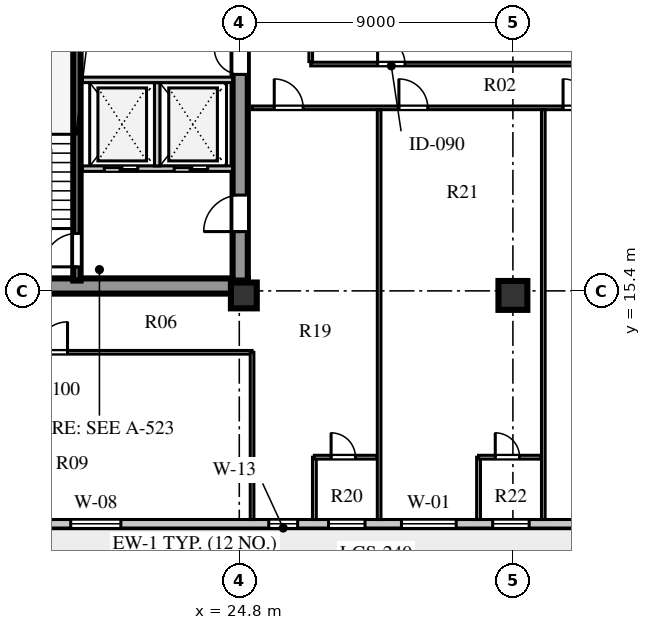
"""IFC4 building model, lengths in metres.
Left out: names, types, materials, properties, quantities, classifications, styles, units other than length and angle.
Written with IfcOpenShell. Run it as: python <this file> out.ifc"""

import sys

from ifc_helpers import new_model, si_unit, direction, frame, frame_2d, origin, origin_2d, place, context, subcontext, project, spatial, rectangle, extrude, element, fill, save


model = new_model("IFC4")
c1 = context("Model", 3, precision=1e-05, world=origin(), true_north=direction((0.0, 1.0)))
c2 = subcontext(c1, "Body", "Model", "MODEL_VIEW")
j1 = project(units=[si_unit("LENGTHUNIT", "METRE"), si_unit("PLANEANGLEUNIT", "RADIAN")], contexts=[c1])
p1 = place(None, origin())
s1 = spatial("IfcSite", under=j1, at=p1, CompositionType="ELEMENT")
p2 = place(p1, origin())
s2 = spatial("IfcBuilding", under=s1, at=p2, CompositionType="ELEMENT")
p3 = place(p2, frame((0.0, 0.0, 173.3)))
s3 = spatial("IfcBuildingStorey", under=s2, at=p3, CompositionType="ELEMENT", Elevation=173.3)
p4 = place(p3, frame((15.4, 15.56, 0.0), z_axis=(0.0, 0.0, 1.0), x_axis=(1.0, 0.0, 0.0)))
e1 = element("IfcWall", 1, at=p4, inside=s3, PredefinedType="SHEAR", context=c2, shape_type="SweptSolid", body=[
    extrude(rectangle(XDim=9.68, YDim=0.5, at=frame_2d((4.84, 0.0))), origin(), (0.0, 0.0, 1.0), 3.6),
])
p5 = place(p3, frame((24.83, 15.74, 0.0), z_axis=(0.0, 0.0, 1.0), x_axis=(0.0, 1.0, 0.0)))
e2 = element("IfcWall", 2, at=p5, inside=s3, PredefinedType="SHEAR", context=c2, shape_type="SweptSolid", body=[
    extrude(rectangle(XDim=25.76, YDim=0.5, at=frame_2d((12.88, 0.0))), origin(), (0.0, 0.0, 1.0), 3.6),
])
p6 = place(p5, frame((1.61, 0.0, 0.0)))
e3 = element("IfcOpeningElement", 3, at=p6, cuts=e2, PredefinedType="OPENING", context=c2, shape_type="SweptSolid", body=[
    extrude(rectangle(XDim=1.2, YDim=2.1, at=frame_2d((0.6, 1.05))), frame((0.0, 0.26, 0.0), z_axis=(0.0, -1.0, 0.0), x_axis=(1.0, 0.0, 0.0)), (0.0, 0.0, 1.0), 0.52),
])
p7 = place(p5, frame((6.78, 0.0, 0.0)))
e4 = element("IfcOpeningElement", 4, at=p7, cuts=e2, PredefinedType="OPENING", context=c2, shape_type="SweptSolid", body=[
    extrude(rectangle(XDim=0.85, YDim=2.06, at=frame_2d((0.425, 1.03))), frame((0.0, 0.26, 0.0), z_axis=(0.0, -1.0, 0.0), x_axis=(1.0, 0.0, 0.0)), (0.0, 0.0, 1.0), 0.52),
])
p8 = place(p5, frame((12.11, 0.0, 0.0)))
e5 = element("IfcOpeningElement", 5, at=p8, cuts=e2, PredefinedType="OPENING", context=c2, shape_type="SweptSolid", body=[
    extrude(rectangle(XDim=1.5, YDim=2.12, at=frame_2d((0.75, 1.06))), frame((0.0, 0.26, 0.0), z_axis=(0.0, -1.0, 0.0), x_axis=(1.0, 0.0, 0.0)), (0.0, 0.0, 1.0), 0.52),
])
p9 = place(p5, frame((20.11, 0.0, 0.0)))
e6 = element("IfcOpeningElement", 6, at=p9, cuts=e2, PredefinedType="OPENING", context=c2, shape_type="SweptSolid", body=[
    extrude(rectangle(XDim=1.2, YDim=2.12, at=frame_2d((0.6, 1.06))), frame((0.0, 0.26, 0.0), z_axis=(0.0, -1.0, 0.0), x_axis=(1.0, 0.0, 0.0)), (0.0, 0.0, 1.0), 0.52),
])
p10 = place(p5, frame((24.01, 0.0, 0.0)))
e7 = element("IfcOpeningElement", 7, at=p10, cuts=e2, PredefinedType="OPENING", context=c2, shape_type="SweptSolid", body=[
    extrude(rectangle(XDim=0.95, YDim=2.1, at=frame_2d((0.475, 1.05))), frame((0.0, 0.26, 0.0), z_axis=(0.0, -1.0, 0.0), x_axis=(1.0, 0.0, 0.0)), (0.0, 0.0, 1.0), 0.52),
])
p11 = place(p3, frame((24.95, 15.25, 0.0), z_axis=(0.0, 0.0, 1.0), x_axis=(1.0, 0.0, 0.0)))
e8 = element("IfcColumn", 8, at=p11, inside=s3, PredefinedType="COLUMN", context=c2, shape_type="SweptSolid", body=[
    extrude(rectangle(XDim=0.85, YDim=0.85, at=origin_2d()), origin(), (0.0, 0.0, 1.0), 3.6),
])
p12 = place(p3, frame((33.8, 15.25, 0.0), z_axis=(0.0, 0.0, 1.0), x_axis=(1.0, 0.0, 0.0)))
e9 = element("IfcColumn", 9, at=p12, inside=s3, PredefinedType="COLUMN", context=c2, shape_type="SweptSolid", body=[
    extrude(rectangle(XDim=0.95, YDim=0.95, at=origin_2d()), origin(), (0.0, 0.0, 1.0), 3.6),
])
p13 = place(p3, frame((13.05, 7.74, 0.0), z_axis=(0.0, 0.0, 1.0), x_axis=(1.0, 0.0, 0.0)))
e10 = element("IfcWall", 10, at=p13, inside=s3, PredefinedType="STANDARD", context=c2, shape_type="SweptSolid", body=[
    extrude(rectangle(XDim=32.5, YDim=0.28, at=frame_2d((16.25, 0.0))), origin(), (0.0, 0.0, 1.0), 3.6),
])
p14 = place(p13, frame((0.95, 0.0, 0.0)))
e11 = element("IfcOpeningElement", 11, at=p14, cuts=e10, PredefinedType="OPENING", context=c2, shape_type="SweptSolid", body=[
    extrude(rectangle(XDim=1.0, YDim=2.05, at=frame_2d((0.5, 1.025))), frame((0.0, 0.15, 0.0), z_axis=(0.0, -1.0, 0.0), x_axis=(1.0, 0.0, 0.0)), (0.0, 0.0, 1.0), 0.3),
])
p15 = place(p13, frame((6.205, 0.0, 0.8)))
e12 = element("IfcOpeningElement", 12, at=p15, cuts=e10, PredefinedType="OPENING", context=c2, shape_type="SweptSolid", body=[
    extrude(rectangle(XDim=1.65, YDim=1.95, at=frame_2d((0.825, 0.975))), frame((0.0, 0.15, 0.0), z_axis=(0.0, -1.0, 0.0), x_axis=(1.0, 0.0, 0.0)), (0.0, 0.0, 1.0), 0.3),
])
p16 = place(p13, frame((12.72, 0.0, 0.8)))
e13 = element("IfcOpeningElement", 13, at=p16, cuts=e10, PredefinedType="OPENING", context=c2, shape_type="SweptSolid", body=[
    extrude(rectangle(XDim=0.95, YDim=1.65, at=frame_2d((0.475, 0.825))), frame((0.0, 0.15, 0.0), z_axis=(0.0, -1.0, 0.0), x_axis=(1.0, 0.0, 0.0)), (0.0, 0.0, 1.0), 0.3),
])
p17 = place(p13, frame((14.685, 0.0, 0.8)))
e14 = element("IfcOpeningElement", 14, at=p17, cuts=e10, PredefinedType="OPENING", context=c2, shape_type="SweptSolid", body=[
    extrude(rectangle(XDim=1.2, YDim=1.75, at=frame_2d((0.6, 0.875))), frame((0.0, 0.15, 0.0), z_axis=(0.0, -1.0, 0.0), x_axis=(1.0, 0.0, 0.0)), (0.0, 0.0, 1.0), 0.3),
])
p18 = place(p13, frame((17.085, 0.0, 0.8)))
e15 = element("IfcOpeningElement", 15, at=p18, cuts=e10, PredefinedType="OPENING", context=c2, shape_type="SweptSolid", body=[
    extrude(rectangle(XDim=1.8, YDim=2.0, at=frame_2d((0.9, 1.0))), frame((0.0, 0.15, 0.0), z_axis=(0.0, -1.0, 0.0), x_axis=(1.0, 0.0, 0.0)), (0.0, 0.0, 1.0), 0.3),
])
p19 = place(p13, frame((20.085, 0.0, 0.8)))
e16 = element("IfcOpeningElement", 16, at=p19, cuts=e10, PredefinedType="OPENING", context=c2, shape_type="SweptSolid", body=[
    extrude(rectangle(XDim=1.2, YDim=1.75, at=frame_2d((0.6, 0.875))), frame((0.0, 0.15, 0.0), z_axis=(0.0, -1.0, 0.0), x_axis=(1.0, 0.0, 0.0)), (0.0, 0.0, 1.0), 0.3),
])
p20 = place(p13, frame((23.055, 0.0, 0.8)))
e17 = element("IfcOpeningElement", 17, at=p20, cuts=e10, PredefinedType="OPENING", context=c2, shape_type="SweptSolid", body=[
    extrude(rectangle(XDim=1.2, YDim=1.75, at=frame_2d((0.6, 0.875))), frame((0.0, 0.15, 0.0), z_axis=(0.0, -1.0, 0.0), x_axis=(1.0, 0.0, 0.0)), (0.0, 0.0, 1.0), 0.3),
])
p21 = place(p13, frame((26.065, 0.0, 0.8)))
e18 = element("IfcOpeningElement", 18, at=p21, cuts=e10, PredefinedType="OPENING", context=c2, shape_type="SweptSolid", body=[
    extrude(rectangle(XDim=1.2, YDim=1.75, at=frame_2d((0.6, 0.875))), frame((0.0, 0.15, 0.0), z_axis=(0.0, -1.0, 0.0), x_axis=(1.0, 0.0, 0.0)), (0.0, 0.0, 1.0), 0.3),
])
p22 = place(p13, frame((29.03, 0.0, 0.8)))
e19 = element("IfcOpeningElement", 19, at=p22, cuts=e10, PredefinedType="OPENING", context=c2, shape_type="SweptSolid", body=[
    extrude(rectangle(XDim=2.1, YDim=1.95, at=frame_2d((1.05, 0.975))), frame((0.0, 0.15, 0.0), z_axis=(0.0, -1.0, 0.0), x_axis=(1.0, 0.0, 0.0)), (0.0, 0.0, 1.0), 0.3),
])
p23 = place(p3, frame((19.46, 15.74, 0.0), z_axis=(0.0, 0.0, 1.0), x_axis=(0.0, 1.0, 0.0)))
e20 = element("IfcWall", 20, at=p23, inside=s3, PredefinedType="SHEAR", context=c2, shape_type="SweptSolid", body=[
    extrude(rectangle(XDim=8.2, YDim=0.24, at=frame_2d((4.1, 0.0))), origin(), (0.0, 0.0, 1.0), 3.85),
])
p24 = place(p23, frame((0.45, 0.0, 0.0)))
e21 = element("IfcOpeningElement", 21, at=p24, cuts=e20, PredefinedType="OPENING", context=c2, shape_type="SweptSolid", body=[
    extrude(rectangle(XDim=1.1, YDim=2.1, at=frame_2d((0.55, 1.05))), frame((0.0, 0.13, 0.0), z_axis=(0.0, -1.0, 0.0), x_axis=(1.0, 0.0, 0.0)), (0.0, 0.0, 1.0), 0.26),
])
p25 = place(p3, frame((19.64, 19.42, 0.0), z_axis=(0.0, 0.0, 1.0), x_axis=(1.0, 0.0, 0.0)))
e22 = element("IfcWall", 22, at=p25, inside=s3, PredefinedType="SOLIDWALL", context=c2, shape_type="SweptSolid", body=[
    extrude(rectangle(XDim=4.94, YDim=0.18, at=frame_2d((2.47, 0.0))), origin(), (0.0, 0.0, 1.0), 3.6),
])
p26 = place(p25, frame((0.72, 0.0, 0.0)))
e23 = element("IfcOpeningElement", 23, at=p26, cuts=e22, PredefinedType="OPENING", context=c2, shape_type="SweptSolid", body=[
    extrude(rectangle(XDim=1.1, YDim=2.1, at=frame_2d((0.55, 1.05))), frame((0.0, 0.1, 0.0), z_axis=(0.0, -1.0, 0.0), x_axis=(1.0, 0.0, 0.0)), (0.0, 0.0, 1.0), 0.2),
])
p27 = place(p25, frame((3.02, 0.0, 0.0)))
e24 = element("IfcOpeningElement", 24, at=p27, cuts=e22, PredefinedType="OPENING", context=c2, shape_type="SweptSolid", body=[
    extrude(rectangle(XDim=1.1, YDim=2.1, at=frame_2d((0.55, 1.05))), frame((0.0, 0.1, 0.0), z_axis=(0.0, -1.0, 0.0), x_axis=(1.0, 0.0, 0.0)), (0.0, 0.0, 1.0), 0.2),
])
p28 = place(p3, frame((22.1, 19.51, 0.0), z_axis=(0.0, 0.0, 1.0), x_axis=(0.0, 1.0, 0.0)))
e25 = element("IfcWall", 25, at=p28, inside=s3, PredefinedType="SOLIDWALL", context=c2, shape_type="SweptSolid", body=[
    extrude(rectangle(XDim=2.74, YDim=0.18, at=frame_2d((1.37, 0.0))), origin(), (0.0, 0.0, 1.0), 3.6),
])
p29 = place(p3, frame((19.64, 22.34, 0.0), z_axis=(0.0, 0.0, 1.0), x_axis=(1.0, 0.0, 0.0)))
e26 = element("IfcWall", 26, at=p29, inside=s3, PredefinedType="SOLIDWALL", context=c2, shape_type="SweptSolid", body=[
    extrude(rectangle(XDim=4.94, YDim=0.18, at=frame_2d((2.47, 0.0))), origin(), (0.0, 0.0, 1.0), 3.6),
])
p30 = place(p3, frame((25.22, 21.42, 0.0), z_axis=(0.0, 0.0, 1.0), x_axis=(1.0, 0.0, 0.0)))
e27 = element("IfcWall", 27, at=p30, inside=s3, PredefinedType="PARTITIONING", context=c2, shape_type="SweptSolid", body=[
    extrude(rectangle(XDim=15.6, YDim=0.12, at=frame_2d((7.8, 0.0))), origin(), (0.0, 0.0, 1.0), 3.25),
])
p31 = place(p30, frame((0.73, 0.0, 0.0)))
e28 = element("IfcOpeningElement", 28, at=p31, cuts=e27, PredefinedType="OPENING", context=c2, shape_type="SweptSolid", body=[
    extrude(rectangle(XDim=0.95, YDim=2.1, at=frame_2d((0.475, 1.05))), frame((0.0, 0.07, 0.0), z_axis=(0.0, -1.0, 0.0), x_axis=(1.0, 0.0, 0.0)), (0.0, 0.0, 1.0), 0.14),
])
p32 = place(p30, frame((4.83, 0.0, 0.0)))
e29 = element("IfcOpeningElement", 29, at=p32, cuts=e27, PredefinedType="OPENING", context=c2, shape_type="SweptSolid", body=[
    extrude(rectangle(XDim=0.95, YDim=2.1, at=frame_2d((0.475, 1.05))), frame((0.0, 0.07, 0.0), z_axis=(0.0, -1.0, 0.0), x_axis=(1.0, 0.0, 0.0)), (0.0, 0.0, 1.0), 0.14),
])
p33 = place(p30, frame((10.23, 0.0, 0.0)))
e30 = element("IfcOpeningElement", 30, at=p33, cuts=e27, PredefinedType="OPENING", context=c2, shape_type="SweptSolid", body=[
    extrude(rectangle(XDim=0.95, YDim=2.1, at=frame_2d((0.475, 1.05))), frame((0.0, 0.07, 0.0), z_axis=(0.0, -1.0, 0.0), x_axis=(1.0, 0.0, 0.0)), (0.0, 0.0, 1.0), 0.14),
])
p34 = place(p3, frame((27.15, 22.86, 0.0), z_axis=(0.0, 0.0, 1.0), x_axis=(1.0, 0.0, 0.0)))
e31 = element("IfcWall", 31, at=p34, inside=s3, PredefinedType="PARTITIONING", context=c2, shape_type="SweptSolid", body=[
    extrude(rectangle(XDim=13.67, YDim=0.12, at=frame_2d((6.835, 0.0))), origin(), (0.0, 0.0, 1.0), 3.6),
])
p35 = place(p34, frame((2.2, 0.0, 0.0)))
e32 = element("IfcOpeningElement", 32, at=p35, cuts=e31, PredefinedType="OPENING", context=c2, shape_type="SweptSolid", body=[
    extrude(rectangle(XDim=0.9, YDim=2.08, at=frame_2d((0.45, 1.04))), frame((0.0, 0.07, 0.0), z_axis=(0.0, -1.0, 0.0), x_axis=(1.0, 0.0, 0.0)), (0.0, 0.0, 1.0), 0.14),
])
p36 = place(p3, frame((13.39, 13.38, 0.0), z_axis=(0.0, 0.0, 1.0), x_axis=(1.0, 0.0, 0.0)))
e33 = element("IfcWall", 33, at=p36, inside=s3, PredefinedType="PARTITIONING", context=c2, shape_type="SweptSolid", body=[
    extrude(rectangle(XDim=11.83, YDim=0.12, at=frame_2d((5.915, 0.0))), origin(), (0.0, 0.0, 1.0), 3.6),
])
p37 = place(p36, frame((4.76, 0.0, 0.0)))
e34 = element("IfcOpeningElement", 34, at=p37, cuts=e33, PredefinedType="OPENING", context=c2, shape_type="SweptSolid", body=[
    extrude(rectangle(XDim=1.0, YDim=2.08, at=frame_2d((0.5, 1.04))), frame((0.0, 0.07, 0.0), z_axis=(0.0, -1.0, 0.0), x_axis=(1.0, 0.0, 0.0)), (0.0, 0.0, 1.0), 0.14),
])
p38 = place(p3, frame((25.22, 7.88, 0.0), z_axis=(0.0, 0.0, 1.0), x_axis=(0.0, 1.0, 0.0)))
e35 = element("IfcWall", 35, at=p38, inside=s3, PredefinedType="PARTITIONING", context=c2, shape_type="SweptSolid", body=[
    extrude(rectangle(XDim=5.5, YDim=0.12, at=frame_2d((2.75, 0.0))), origin(), (0.0, 0.0, 1.0), 3.15),
])
p39 = place(p3, frame((27.15, 22.94, 0.0), z_axis=(0.0, 0.0, 1.0), x_axis=(0.0, 1.0, 0.0)))
e36 = element("IfcWall", 36, at=p39, inside=s3, PredefinedType="PARTITIONING", context=c2, shape_type="SweptSolid", body=[
    extrude(rectangle(XDim=1.94, YDim=0.12, at=frame_2d((0.97, 0.0))), origin(), (0.0, 0.0, 1.0), 3.6),
])
p40 = place(p3, frame((27.27, 7.88, 0.0), z_axis=(0.0, 0.0, 1.0), x_axis=(0.0, 1.0, 0.0)))
e37 = element("IfcWall", 37, at=p40, inside=s3, PredefinedType="PLUMBINGWALL", context=c2, shape_type="SweptSolid", body=[
    extrude(rectangle(XDim=2.05, YDim=0.125, at=frame_2d((1.025, 0.0))), origin(), (0.0, 0.0, 1.0), 3.6),
])
p41 = place(p3, frame((27.27, 9.93, 0.0), z_axis=(0.0, 0.0, 1.0), x_axis=(1.0, 0.0, 0.0)))
e38 = element("IfcWall", 38, at=p41, inside=s3, PredefinedType="PLUMBINGWALL", context=c2, shape_type="SweptSolid", body=[
    extrude(rectangle(XDim=2.05, YDim=0.125, at=frame_2d((1.025, 0.0))), origin(), (0.0, 0.0, 1.0), 3.6),
])
p42 = place(p41, frame((0.55, 0.0, 0.0)))
e39 = element("IfcOpeningElement", 39, at=p42, cuts=e38, PredefinedType="OPENING", context=c2, shape_type="SweptSolid", body=[
    extrude(rectangle(XDim=0.8, YDim=2.05, at=frame_2d((0.4, 1.025))), frame((0.0, 0.073, 0.0), z_axis=(0.0, -1.0, 0.0), x_axis=(1.0, 0.0, 0.0)), (0.0, 0.0, 1.0), 0.145),
])
p43 = place(p3, frame((29.4, 7.88, 0.0), z_axis=(0.0, 0.0, 1.0), x_axis=(0.0, 1.0, 0.0)))
e40 = element("IfcWall", 40, at=p43, inside=s3, PredefinedType="PARTITIONING", context=c2, shape_type="SweptSolid", body=[
    extrude(rectangle(XDim=13.48, YDim=0.12, at=frame_2d((6.74, 0.0))), origin(), (0.0, 0.0, 1.0), 3.6),
])
p44 = place(p3, frame((32.67, 7.88, 0.0), z_axis=(0.0, 0.0, 1.0), x_axis=(0.0, 1.0, 0.0)))
e41 = element("IfcWall", 41, at=p44, inside=s3, PredefinedType="PLUMBINGWALL", context=c2, shape_type="SweptSolid", body=[
    extrude(rectangle(XDim=2.05, YDim=0.125, at=frame_2d((1.025, 0.0))), origin(), (0.0, 0.0, 1.0), 3.6),
])
p45 = place(p3, frame((32.67, 9.93, 0.0), z_axis=(0.0, 0.0, 1.0), x_axis=(1.0, 0.0, 0.0)))
e42 = element("IfcWall", 42, at=p45, inside=s3, PredefinedType="PLUMBINGWALL", context=c2, shape_type="SweptSolid", body=[
    extrude(rectangle(XDim=2.05, YDim=0.125, at=frame_2d((1.025, 0.0))), origin(), (0.0, 0.0, 1.0), 3.6),
])
p46 = place(p45, frame((0.55, 0.0, 0.0)))
e43 = element("IfcOpeningElement", 43, at=p46, cuts=e42, PredefinedType="OPENING", context=c2, shape_type="SweptSolid", body=[
    extrude(rectangle(XDim=0.8, YDim=2.05, at=frame_2d((0.4, 1.025))), frame((0.0, 0.073, 0.0), z_axis=(0.0, -1.0, 0.0), x_axis=(1.0, 0.0, 0.0)), (0.0, 0.0, 1.0), 0.145),
])
p47 = place(p3, frame((34.8, 7.88, 0.0), z_axis=(0.0, 0.0, 1.0), x_axis=(0.0, 1.0, 0.0)))
e44 = element("IfcWall", 44, at=p47, inside=s3, PredefinedType="PARTITIONING", context=c2, shape_type="SweptSolid", body=[
    extrude(rectangle(XDim=13.48, YDim=0.12, at=frame_2d((6.74, 0.0))), origin(), (0.0, 0.0, 1.0), 3.6),
])
p48 = place(p15, origin())
e45 = element("IfcWindow", 45, at=p48, inside=s3, PartitioningType="SINGLE_PANEL", PredefinedType="WINDOW", context=c2, shape_type="SweptSolid", body=[
    extrude(rectangle(XDim=1.65, YDim=1.95, at=frame_2d((0.825, 0.975))), frame((0.0, 0.03, 0.0), z_axis=(0.0, -1.0, 0.0), x_axis=(1.0, 0.0, 0.0)), (0.0, 0.0, 1.0), 0.06),
])
fill(e12, e45)
p49 = place(p16, origin())
e46 = element("IfcWindow", 46, at=p49, inside=s3, PartitioningType="SINGLE_PANEL", PredefinedType="WINDOW", context=c2, shape_type="SweptSolid", body=[
    extrude(rectangle(XDim=0.95, YDim=1.65, at=frame_2d((0.475, 0.825))), frame((0.0, 0.03, 0.0), z_axis=(0.0, -1.0, 0.0), x_axis=(1.0, 0.0, 0.0)), (0.0, 0.0, 1.0), 0.06),
])
fill(e13, e46)
p50 = place(p17, origin())
e47 = element("IfcWindow", 47, at=p50, inside=s3, PartitioningType="SINGLE_PANEL", PredefinedType="WINDOW", context=c2, shape_type="SweptSolid", body=[
    extrude(rectangle(XDim=1.2, YDim=1.75, at=frame_2d((0.6, 0.875))), frame((0.0, 0.03, 0.0), z_axis=(0.0, -1.0, 0.0), x_axis=(1.0, 0.0, 0.0)), (0.0, 0.0, 1.0), 0.06),
])
fill(e14, e47)
p51 = place(p18, origin())
e48 = element("IfcWindow", 48, at=p51, inside=s3, PartitioningType="SINGLE_PANEL", PredefinedType="WINDOW", context=c2, shape_type="SweptSolid", body=[
    extrude(rectangle(XDim=1.8, YDim=2.0, at=frame_2d((0.9, 1.0))), frame((0.0, 0.03, 0.0), z_axis=(0.0, -1.0, 0.0), x_axis=(1.0, 0.0, 0.0)), (0.0, 0.0, 1.0), 0.06),
])
fill(e15, e48)
p52 = place(p19, origin())
e49 = element("IfcWindow", 49, at=p52, inside=s3, PartitioningType="SINGLE_PANEL", PredefinedType="WINDOW", context=c2, shape_type="SweptSolid", body=[
    extrude(rectangle(XDim=1.2, YDim=1.75, at=frame_2d((0.6, 0.875))), frame((0.0, 0.03, 0.0), z_axis=(0.0, -1.0, 0.0), x_axis=(1.0, 0.0, 0.0)), (0.0, 0.0, 1.0), 0.06),
])
fill(e16, e49)
p53 = place(p24, origin())
e50 = element("IfcDoor", 50, at=p53, inside=s3, OperationType="SINGLE_SWING_LEFT", PredefinedType="DOOR", context=c2, shape_type="SweptSolid", body=[
    extrude(rectangle(XDim=1.1, YDim=2.1, at=frame_2d((0.55, 1.05))), frame((0.0, 0.025, 0.0), z_axis=(0.0, -1.0, 0.0), x_axis=(1.0, 0.0, 0.0)), (0.0, 0.0, 1.0), 0.05),
])
fill(e21, e50)
p54 = place(p26, origin())
e51 = element("IfcDoor", 51, at=p54, inside=s3, OperationType="DOUBLE_DOOR_SLIDING", PredefinedType="DOOR", context=c2, shape_type="SweptSolid", body=[
    extrude(rectangle(XDim=1.1, YDim=2.1, at=frame_2d((0.55, 1.05))), frame((0.0, 0.025, 0.0), z_axis=(0.0, -1.0, 0.0), x_axis=(1.0, 0.0, 0.0)), (0.0, 0.0, 1.0), 0.05),
])
fill(e23, e51)
p55 = place(p27, origin())
e52 = element("IfcDoor", 52, at=p55, inside=s3, OperationType="DOUBLE_DOOR_SLIDING", PredefinedType="DOOR", context=c2, shape_type="SweptSolid", body=[
    extrude(rectangle(XDim=1.1, YDim=2.1, at=frame_2d((0.55, 1.05))), frame((0.0, 0.025, 0.0), z_axis=(0.0, -1.0, 0.0), x_axis=(1.0, 0.0, 0.0)), (0.0, 0.0, 1.0), 0.05),
])
fill(e24, e52)
p56 = place(p6, frame((1.2, 0.0, 0.0), z_axis=(0.0, 0.0, 1.0), x_axis=(-1.0, 0.0, 0.0)))
e53 = element("IfcDoor", 53, at=p56, inside=s3, OperationType="SINGLE_SWING_RIGHT", PredefinedType="DOOR", context=c2, shape_type="SweptSolid", body=[
    extrude(rectangle(XDim=1.2, YDim=2.1, at=frame_2d((0.6, 1.05))), frame((0.0, 0.025, 0.0), z_axis=(0.0, -1.0, 0.0), x_axis=(1.0, 0.0, 0.0)), (0.0, 0.0, 1.0), 0.05),
])
fill(e3, e53)
p57 = place(p7, frame((0.85, 0.0, 0.0), z_axis=(0.0, 0.0, 1.0), x_axis=(-1.0, 0.0, 0.0)))
e54 = element("IfcDoor", 54, at=p57, inside=s3, OperationType="SINGLE_SWING_LEFT", PredefinedType="DOOR", context=c2, shape_type="SweptSolid", body=[
    extrude(rectangle(XDim=0.85, YDim=2.06, at=frame_2d((0.425, 1.03))), frame((0.0, 0.025, 0.0), z_axis=(0.0, -1.0, 0.0), x_axis=(1.0, 0.0, 0.0)), (0.0, 0.0, 1.0), 0.05),
])
fill(e4, e54)
p58 = place(p37, frame((1.0, 0.0, 0.0), z_axis=(0.0, 0.0, 1.0), x_axis=(-1.0, 0.0, 0.0)))
e55 = element("IfcDoor", 55, at=p58, inside=s3, OperationType="SINGLE_SWING_LEFT", PredefinedType="DOOR", context=c2, shape_type="SweptSolid", body=[
    extrude(rectangle(XDim=1.0, YDim=2.08, at=frame_2d((0.5, 1.04))), frame((0.0, 0.025, 0.0), z_axis=(0.0, -1.0, 0.0), x_axis=(1.0, 0.0, 0.0)), (0.0, 0.0, 1.0), 0.05),
])
fill(e34, e55)
p59 = place(p35, origin())
e56 = element("IfcDoor", 56, at=p59, inside=s3, OperationType="SINGLE_SWING_LEFT", PredefinedType="DOOR", context=c2, shape_type="SweptSolid", body=[
    extrude(rectangle(XDim=0.9, YDim=2.08, at=frame_2d((0.45, 1.04))), frame((0.0, 0.025, 0.0), z_axis=(0.0, -1.0, 0.0), x_axis=(1.0, 0.0, 0.0)), (0.0, 0.0, 1.0), 0.05),
])
fill(e32, e56)
p60 = place(p31, frame((0.95, 0.0, 0.0), z_axis=(0.0, 0.0, 1.0), x_axis=(-1.0, 0.0, 0.0)))
e57 = element("IfcDoor", 57, at=p60, inside=s3, OperationType="SINGLE_SWING_RIGHT", PredefinedType="DOOR", context=c2, shape_type="SweptSolid", body=[
    extrude(rectangle(XDim=0.95, YDim=2.1, at=frame_2d((0.475, 1.05))), frame((0.0, 0.025, 0.0), z_axis=(0.0, -1.0, 0.0), x_axis=(1.0, 0.0, 0.0)), (0.0, 0.0, 1.0), 0.05),
])
fill(e28, e57)
p61 = place(p42, origin())
e58 = element("IfcDoor", 58, at=p61, inside=s3, OperationType="SINGLE_SWING_LEFT", PredefinedType="DOOR", context=c2, shape_type="SweptSolid", body=[
    extrude(rectangle(XDim=0.8, YDim=2.05, at=frame_2d((0.4, 1.025))), frame((0.0, 0.025, 0.0), z_axis=(0.0, -1.0, 0.0), x_axis=(1.0, 0.0, 0.0)), (0.0, 0.0, 1.0), 0.05),
])
fill(e39, e58)
p62 = place(p32, frame((0.95, 0.0, 0.0), z_axis=(0.0, 0.0, 1.0), x_axis=(-1.0, 0.0, 0.0)))
e59 = element("IfcDoor", 59, at=p62, inside=s3, OperationType="SINGLE_SWING_RIGHT", PredefinedType="DOOR", context=c2, shape_type="SweptSolid", body=[
    extrude(rectangle(XDim=0.95, YDim=2.1, at=frame_2d((0.475, 1.05))), frame((0.0, 0.025, 0.0), z_axis=(0.0, -1.0, 0.0), x_axis=(1.0, 0.0, 0.0)), (0.0, 0.0, 1.0), 0.05),
])
fill(e29, e59)
p63 = place(p46, origin())
e60 = element("IfcDoor", 60, at=p63, inside=s3, OperationType="SINGLE_SWING_LEFT", PredefinedType="DOOR", context=c2, shape_type="SweptSolid", body=[
    extrude(rectangle(XDim=0.8, YDim=2.05, at=frame_2d((0.4, 1.025))), frame((0.0, 0.025, 0.0), z_axis=(0.0, -1.0, 0.0), x_axis=(1.0, 0.0, 0.0)), (0.0, 0.0, 1.0), 0.05),
])
fill(e43, e60)
p64 = place(p33, frame((0.95, 0.0, 0.0), z_axis=(0.0, 0.0, 1.0), x_axis=(-1.0, 0.0, 0.0)))
e61 = element("IfcDoor", 61, at=p64, inside=s3, OperationType="SINGLE_SWING_RIGHT", PredefinedType="DOOR", context=c2, shape_type="SweptSolid", body=[
    extrude(rectangle(XDim=0.95, YDim=2.1, at=frame_2d((0.475, 1.05))), frame((0.0, 0.025, 0.0), z_axis=(0.0, -1.0, 0.0), x_axis=(1.0, 0.0, 0.0)), (0.0, 0.0, 1.0), 0.05),
])
fill(e30, e61)
save(model, sys.argv[1])
